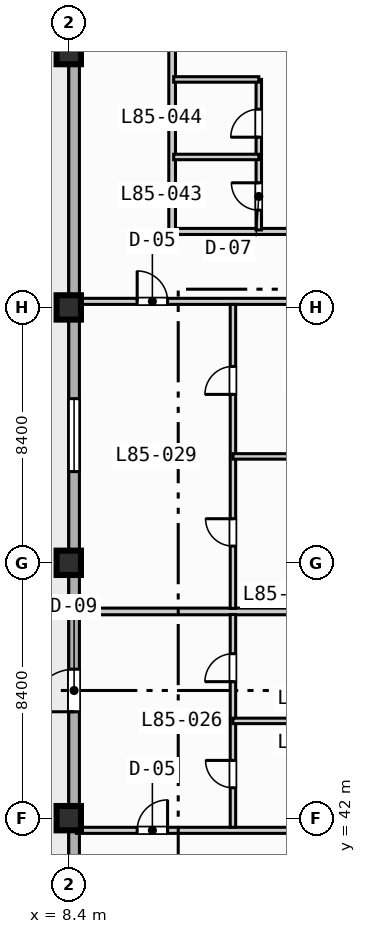
"""IFC4 building model, lengths in metres.
Left out: names, types, materials, properties, quantities, classifications, styles, units other than length and angle.
Written with IfcOpenShell. Run it as: python <this file> out.ifc"""

import sys

from ifc_helpers import new_model, si_unit, direction, frame, frame_2d, origin, origin_2d, place, context, subcontext, project, spatial, rectangle, extrude, element, fill, save


model = new_model("IFC4")
c1 = context("Model", 3, precision=1e-05, world=origin(), true_north=direction((0.0, 1.0)))
c2 = subcontext(c1, "Body", "Model", "MODEL_VIEW")
j1 = project(units=[si_unit("LENGTHUNIT", "METRE"), si_unit("PLANEANGLEUNIT", "RADIAN")], contexts=[c1])
p1 = place(None, origin())
s1 = spatial("IfcSite", under=j1, at=p1, CompositionType="ELEMENT")
p2 = place(p1, origin())
s2 = spatial("IfcBuilding", under=s1, at=p2, CompositionType="ELEMENT")
p3 = place(p2, frame((0.0, 0.0, 343.7)))
s3 = spatial("IfcBuildingStorey", under=s2, at=p3, CompositionType="ELEMENT", Elevation=343.7)
for number, where, z_axis, x_axis in (
    (1, (8.4, 42.0, 0.0), (0.0, 0.0, 1.0), (1.0, 0.0, 0.0)),
    (2, (8.4, 50.4, 0.0), (0.0, 0.0, 1.0), (1.0, 0.0, 0.0)),
    (3, (8.4, 58.8, 0.0), (0.0, 0.0, 1.0), (1.0, 0.0, 0.0)),
    (4, (8.4, 67.2, 0.0), (0.0, 0.0, 1.0), (1.0, 0.0, 0.0)),
):
    element("IfcColumn", number, at=place(p3, frame(where, z_axis=z_axis, x_axis=x_axis)), inside=s3, PredefinedType="COLUMN", context=c2, shape_type="SweptSolid", body=[
        extrude(rectangle(XDim=0.8, YDim=0.8, at=origin_2d()), origin(), (0.0, 0.0, 1.0), 3.9),
    ])
p4 = place(p3, frame((8.575, 11.575, 0.0), z_axis=(0.0, 0.0, 1.0), x_axis=(0.0, 1.0, 0.0)))
e5 = element("IfcWall", 5, at=p4, inside=s3, PredefinedType="STANDARD", context=c2, shape_type="SweptSolid", body=[
    extrude(rectangle(XDim=60.85, YDim=0.35, at=frame_2d((30.425, 0.0))), origin(), (0.0, 0.0, 1.0), 3.67),
])
p5 = place(p4, frame((33.925, 0.0, 0.0)))
e6 = element("IfcOpeningElement", 6, at=p5, cuts=e5, PredefinedType="OPENING", context=c2, shape_type="SweptSolid", body=[
    extrude(rectangle(XDim=1.4, YDim=2.2, at=frame_2d((0.7, 1.1))), frame((0.0, 0.185, 0.0), z_axis=(0.0, -1.0, 0.0), x_axis=(1.0, 0.0, 0.0)), (0.0, 0.0, 1.0), 0.37),
])
p6 = place(p4, frame((25.025, 0.0, 0.85)))
e7 = element("IfcOpeningElement", 7, at=p6, cuts=e5, PredefinedType="OPENING", context=c2, shape_type="SweptSolid", body=[
    extrude(rectangle(XDim=2.4, YDim=1.95, at=frame_2d((1.2, 0.975))), frame((0.0, 0.185, 0.0), z_axis=(0.0, -1.0, 0.0), x_axis=(1.0, 0.0, 0.0)), (0.0, 0.0, 1.0), 0.37),
])
p7 = place(p4, frame((41.825, 0.0, 0.85)))
e8 = element("IfcOpeningElement", 8, at=p7, cuts=e5, PredefinedType="OPENING", context=c2, shape_type="SweptSolid", body=[
    extrude(rectangle(XDim=2.4, YDim=1.95, at=frame_2d((1.2, 0.975))), frame((0.0, 0.185, 0.0), z_axis=(0.0, -1.0, 0.0), x_axis=(1.0, 0.0, 0.0)), (0.0, 0.0, 1.0), 0.37),
])
p8 = place(p4, frame((19.25, 0.0, 0.85)))
e9 = element("IfcOpeningElement", 9, at=p8, cuts=e5, PredefinedType="OPENING", context=c2, shape_type="SweptSolid", body=[
    extrude(rectangle(XDim=1.8, YDim=1.8, at=frame_2d((0.9, 0.9))), frame((0.0, 0.185, 0.0), z_axis=(0.0, -1.0, 0.0), x_axis=(1.0, 0.0, 0.0)), (0.0, 0.0, 1.0), 0.37),
])
p9 = place(p3, frame((8.65, 41.6, 0.0), z_axis=(0.0, 0.0, 1.0), x_axis=(1.0, 0.0, 0.0)))
e10 = element("IfcWall", 10, at=p9, inside=s3, PredefinedType="PARTITIONING", context=c2, shape_type="SweptSolid", body=[
    extrude(rectangle(XDim=7.95, YDim=0.2, at=frame_2d((3.975, 0.0))), origin(), (0.0, 0.0, 1.0), 3.67),
])
p10 = place(p9, frame((2.0, 0.0, 0.0)))
e11 = element("IfcOpeningElement", 11, at=p10, cuts=e10, PredefinedType="OPENING", context=c2, shape_type="SweptSolid", body=[
    extrude(rectangle(XDim=1.0, YDim=2.15, at=frame_2d((0.5, 1.075))), frame((0.0, 0.11, 0.0), z_axis=(0.0, -1.0, 0.0), x_axis=(1.0, 0.0, 0.0)), (0.0, 0.0, 1.0), 0.22),
])
p11 = place(p3, frame((8.65, 59.0, 0.0), z_axis=(0.0, 0.0, 1.0), x_axis=(1.0, 0.0, 0.0)))
e12 = element("IfcWall", 12, at=p11, inside=s3, PredefinedType="PARTITIONING", context=c2, shape_type="SweptSolid", body=[
    extrude(rectangle(XDim=7.95, YDim=0.2, at=frame_2d((3.975, 0.0))), origin(), (0.0, 0.0, 1.0), 3.053),
])
p12 = place(p11, frame((2.0, 0.0, 0.0)))
e13 = element("IfcOpeningElement", 13, at=p12, cuts=e12, PredefinedType="OPENING", context=c2, shape_type="SweptSolid", body=[
    extrude(rectangle(XDim=1.0, YDim=2.15, at=frame_2d((0.5, 1.075))), frame((0.0, 0.11, 0.0), z_axis=(0.0, -1.0, 0.0), x_axis=(1.0, 0.0, 0.0)), (0.0, 0.0, 1.0), 0.22),
])
p13 = place(p3, frame((8.65, 48.8, 0.0), z_axis=(0.0, 0.0, 1.0), x_axis=(1.0, 0.0, 0.0)))
e14 = element("IfcWall", 14, at=p13, inside=s3, PredefinedType="PARTITIONING", context=c2, shape_type="SweptSolid", body=[
    extrude(rectangle(XDim=7.95, YDim=0.22, at=frame_2d((3.975, 0.0))), origin(), (0.0, 0.0, 1.0), 3.67),
])
p14 = place(p3, frame((13.8, 41.7, 0.0), z_axis=(0.0, 0.0, 1.0), x_axis=(0.0, 1.0, 0.0)))
e15 = element("IfcWall", 15, at=p14, inside=s3, PredefinedType="PLUMBINGWALL", context=c2, shape_type="SweptSolid", body=[
    extrude(rectangle(XDim=7.0, YDim=0.18, at=frame_2d((3.5, 0.0))), origin(), (0.0, 0.0, 1.0), 3.67),
])
p15 = place(p14, frame((1.3, 0.0, 0.0)))
e16 = element("IfcOpeningElement", 16, at=p15, cuts=e15, PredefinedType="OPENING", context=c2, shape_type="SweptSolid", body=[
    extrude(rectangle(XDim=0.9, YDim=2.1, at=frame_2d((0.45, 1.05))), frame((0.0, 0.1, 0.0), z_axis=(0.0, -1.0, 0.0), x_axis=(1.0, 0.0, 0.0)), (0.0, 0.0, 1.0), 0.2),
])
p16 = place(p14, frame((4.79, 0.0, 0.0)))
e17 = element("IfcOpeningElement", 17, at=p16, cuts=e15, PredefinedType="OPENING", context=c2, shape_type="SweptSolid", body=[
    extrude(rectangle(XDim=0.92, YDim=2.1, at=frame_2d((0.46, 1.05))), frame((0.0, 0.1, 0.0), z_axis=(0.0, -1.0, 0.0), x_axis=(1.0, 0.0, 0.0)), (0.0, 0.0, 1.0), 0.2),
])
p17 = place(p3, frame((13.8, 45.2, 0.0), z_axis=(0.0, 0.0, 1.0), x_axis=(1.0, 0.0, 0.0)))
e18 = element("IfcWall", 18, at=p17, inside=s3, PredefinedType="PLUMBINGWALL", context=c2, shape_type="SweptSolid", body=[
    extrude(rectangle(XDim=2.8, YDim=0.18, at=frame_2d((1.4, 0.0))), origin(), (0.0, 0.0, 1.0), 3.67),
])
p18 = place(p3, frame((13.8, 48.9, 0.0), z_axis=(0.0, 0.0, 1.0), x_axis=(0.0, 1.0, 0.0)))
e19 = element("IfcWall", 19, at=p18, inside=s3, PredefinedType="PLUMBINGWALL", context=c2, shape_type="SweptSolid", body=[
    extrude(rectangle(XDim=10.0, YDim=0.18, at=frame_2d((5.0, 0.0))), origin(), (0.0, 0.0, 1.0), 3.67),
])
p19 = place(p18, frame((2.05, 0.0, 0.0)))
e20 = element("IfcOpeningElement", 20, at=p19, cuts=e19, PredefinedType="OPENING", context=c2, shape_type="SweptSolid", body=[
    extrude(rectangle(XDim=0.9, YDim=2.1, at=frame_2d((0.45, 1.05))), frame((0.0, 0.1, 0.0), z_axis=(0.0, -1.0, 0.0), x_axis=(1.0, 0.0, 0.0)), (0.0, 0.0, 1.0), 0.2),
])
p20 = place(p18, frame((7.04, 0.0, 0.0)))
e21 = element("IfcOpeningElement", 21, at=p20, cuts=e19, PredefinedType="OPENING", context=c2, shape_type="SweptSolid", body=[
    extrude(rectangle(XDim=0.92, YDim=2.1, at=frame_2d((0.46, 1.05))), frame((0.0, 0.1, 0.0), z_axis=(0.0, -1.0, 0.0), x_axis=(1.0, 0.0, 0.0)), (0.0, 0.0, 1.0), 0.2),
])
p21 = place(p3, frame((13.8, 53.9, 0.0), z_axis=(0.0, 0.0, 1.0), x_axis=(1.0, 0.0, 0.0)))
e22 = element("IfcWall", 22, at=p21, inside=s3, PredefinedType="PLUMBINGWALL", context=c2, shape_type="SweptSolid", body=[
    extrude(rectangle(XDim=2.8, YDim=0.18, at=frame_2d((1.4, 0.0))), origin(), (0.0, 0.0, 1.0), 3.67),
])
p22 = place(p3, frame((11.8, 61.3, 0.0), z_axis=(0.0, 0.0, 1.0), x_axis=(1.0, 0.0, 0.0)))
e23 = element("IfcWall", 23, at=p22, inside=s3, PredefinedType="PARTITIONING", context=c2, shape_type="SweptSolid", body=[
    extrude(rectangle(XDim=21.35, YDim=0.2, at=frame_2d((10.675, 0.0))), origin(), (0.0, 0.0, 1.0), 3.67),
])
p23 = place(p22, frame((4.05, 0.0, 0.0)))
e24 = element("IfcOpeningElement", 24, at=p23, cuts=e23, PredefinedType="OPENING", context=c2, shape_type="SweptSolid", body=[
    extrude(rectangle(XDim=1.0, YDim=2.15, at=frame_2d((0.5, 1.075))), frame((0.0, 0.11, 0.0), z_axis=(0.0, -1.0, 0.0), x_axis=(1.0, 0.0, 0.0)), (0.0, 0.0, 1.0), 0.22),
])
p24 = place(p3, frame((11.8, 61.3, 0.0), z_axis=(0.0, 0.0, 1.0), x_axis=(0.0, 1.0, 0.0)))
e25 = element("IfcWall", 25, at=p24, inside=s3, PredefinedType="PARTITIONING", context=c2, shape_type="SweptSolid", body=[
    extrude(rectangle(XDim=11.1, YDim=0.22, at=frame_2d((5.55, 0.0))), origin(), (0.0, 0.0, 1.0), 3.67),
])
p25 = place(p3, frame((14.65, 61.35, 0.0), z_axis=(0.0, 0.0, 1.0), x_axis=(0.0, 1.0, 0.0)))
e26 = element("IfcWall", 26, at=p25, inside=s3, PredefinedType="PLUMBINGWALL", context=c2, shape_type="SweptSolid", body=[
    extrude(rectangle(XDim=4.95, YDim=0.18, at=frame_2d((2.475, 0.0))), origin(), (0.0, 0.0, 1.0), 3.67),
])
p26 = place(p25, frame((0.65, 0.0, 0.0)))
e27 = element("IfcOpeningElement", 27, at=p26, cuts=e26, PredefinedType="OPENING", context=c2, shape_type="SweptSolid", body=[
    extrude(rectangle(XDim=0.9, YDim=2.1, at=frame_2d((0.45, 1.05))), frame((0.0, 0.1, 0.0), z_axis=(0.0, -1.0, 0.0), x_axis=(1.0, 0.0, 0.0)), (0.0, 0.0, 1.0), 0.2),
])
p27 = place(p25, frame((3.05, 0.0, 0.0)))
e28 = element("IfcOpeningElement", 28, at=p27, cuts=e26, PredefinedType="OPENING", context=c2, shape_type="SweptSolid", body=[
    extrude(rectangle(XDim=0.92, YDim=2.1, at=frame_2d((0.46, 1.05))), frame((0.0, 0.1, 0.0), z_axis=(0.0, -1.0, 0.0), x_axis=(1.0, 0.0, 0.0)), (0.0, 0.0, 1.0), 0.2),
])
for number, where, z_axis, x_axis in (
    (29, (11.85, 63.75, 0.0), (0.0, 0.0, 1.0), (1.0, 0.0, 0.0)),
    (30, (11.85, 66.3, 0.0), (0.0, 0.0, 1.0), (1.0, 0.0, 0.0)),
):
    element("IfcWall", number, at=place(p3, frame(where, z_axis=z_axis, x_axis=x_axis)), inside=s3, PredefinedType="PLUMBINGWALL", context=c2, shape_type="SweptSolid", body=[
        extrude(rectangle(XDim=2.8, YDim=0.18, at=frame_2d((1.4, 0.0))), origin(), (0.0, 0.0, 1.0), 3.67),
    ])
p28 = place(p5, origin())
e31 = element("IfcDoor", 31, at=p28, inside=s3, OperationType="SINGLE_SWING_LEFT", PredefinedType="DOOR", context=c2, shape_type="SweptSolid", body=[
    extrude(rectangle(XDim=1.4, YDim=2.2, at=frame_2d((0.7, 1.1))), frame((0.0, 0.025, 0.0), z_axis=(0.0, -1.0, 0.0), x_axis=(1.0, 0.0, 0.0)), (0.0, 0.0, 1.0), 0.05),
])
fill(e6, e31)
p29 = place(p7, origin())
e32 = element("IfcWindow", 32, at=p29, inside=s3, PartitioningType="SINGLE_PANEL", PredefinedType="WINDOW", context=c2, shape_type="SweptSolid", body=[
    extrude(rectangle(XDim=2.4, YDim=1.95, at=frame_2d((1.2, 0.975))), frame((0.0, 0.03, 0.0), z_axis=(0.0, -1.0, 0.0), x_axis=(1.0, 0.0, 0.0)), (0.0, 0.0, 1.0), 0.06),
])
fill(e8, e32)
p30 = place(p10, origin())
e33 = element("IfcDoor", 33, at=p30, inside=s3, OperationType="SINGLE_SWING_RIGHT", PredefinedType="DOOR", context=c2, shape_type="SweptSolid", body=[
    extrude(rectangle(XDim=1.0, YDim=2.15, at=frame_2d((0.5, 1.075))), frame((0.0, 0.025, 0.0), z_axis=(0.0, -1.0, 0.0), x_axis=(1.0, 0.0, 0.0)), (0.0, 0.0, 1.0), 0.05),
])
fill(e11, e33)
p31 = place(p12, origin())
e34 = element("IfcDoor", 34, at=p31, inside=s3, OperationType="SINGLE_SWING_LEFT", PredefinedType="DOOR", context=c2, shape_type="SweptSolid", body=[
    extrude(rectangle(XDim=1.0, YDim=2.15, at=frame_2d((0.5, 1.075))), frame((0.0, 0.025, 0.0), z_axis=(0.0, -1.0, 0.0), x_axis=(1.0, 0.0, 0.0)), (0.0, 0.0, 1.0), 0.05),
])
fill(e13, e34)
p32 = place(p15, origin())
e35 = element("IfcDoor", 35, at=p32, inside=s3, OperationType="SINGLE_SWING_RIGHT", PredefinedType="DOOR", context=c2, shape_type="SweptSolid", body=[
    extrude(rectangle(XDim=0.9, YDim=2.1, at=frame_2d((0.45, 1.05))), frame((0.0, 0.025, 0.0), z_axis=(0.0, -1.0, 0.0), x_axis=(1.0, 0.0, 0.0)), (0.0, 0.0, 1.0), 0.05),
])
fill(e16, e35)
p33 = place(p16, origin())
e36 = element("IfcDoor", 36, at=p33, inside=s3, OperationType="SINGLE_SWING_LEFT", PredefinedType="DOOR", context=c2, shape_type="SweptSolid", body=[
    extrude(rectangle(XDim=0.92, YDim=2.1, at=frame_2d((0.46, 1.05))), frame((0.0, 0.025, 0.0), z_axis=(0.0, -1.0, 0.0), x_axis=(1.0, 0.0, 0.0)), (0.0, 0.0, 1.0), 0.05),
])
fill(e17, e36)
p34 = place(p19, origin())
e37 = element("IfcDoor", 37, at=p34, inside=s3, OperationType="SINGLE_SWING_RIGHT", PredefinedType="DOOR", context=c2, shape_type="SweptSolid", body=[
    extrude(rectangle(XDim=0.9, YDim=2.1, at=frame_2d((0.45, 1.05))), frame((0.0, 0.025, 0.0), z_axis=(0.0, -1.0, 0.0), x_axis=(1.0, 0.0, 0.0)), (0.0, 0.0, 1.0), 0.05),
])
fill(e20, e37)
p35 = place(p20, origin())
e38 = element("IfcDoor", 38, at=p35, inside=s3, OperationType="SINGLE_SWING_LEFT", PredefinedType="DOOR", context=c2, shape_type="SweptSolid", body=[
    extrude(rectangle(XDim=0.92, YDim=2.1, at=frame_2d((0.46, 1.05))), frame((0.0, 0.025, 0.0), z_axis=(0.0, -1.0, 0.0), x_axis=(1.0, 0.0, 0.0)), (0.0, 0.0, 1.0), 0.05),
])
fill(e21, e38)
p36 = place(p26, origin())
e39 = element("IfcDoor", 39, at=p36, inside=s3, OperationType="SINGLE_SWING_RIGHT", PredefinedType="DOOR", context=c2, shape_type="SweptSolid", body=[
    extrude(rectangle(XDim=0.9, YDim=2.1, at=frame_2d((0.45, 1.05))), frame((0.0, 0.025, 0.0), z_axis=(0.0, -1.0, 0.0), x_axis=(1.0, 0.0, 0.0)), (0.0, 0.0, 1.0), 0.05),
])
fill(e27, e39)
p37 = place(p27, origin())
e40 = element("IfcDoor", 40, at=p37, inside=s3, OperationType="SINGLE_SWING_LEFT", PredefinedType="DOOR", context=c2, shape_type="SweptSolid", body=[
    extrude(rectangle(XDim=0.92, YDim=2.1, at=frame_2d((0.46, 1.05))), frame((0.0, 0.025, 0.0), z_axis=(0.0, -1.0, 0.0), x_axis=(1.0, 0.0, 0.0)), (0.0, 0.0, 1.0), 0.05),
])
fill(e28, e40)
save(model, sys.argv[1])
